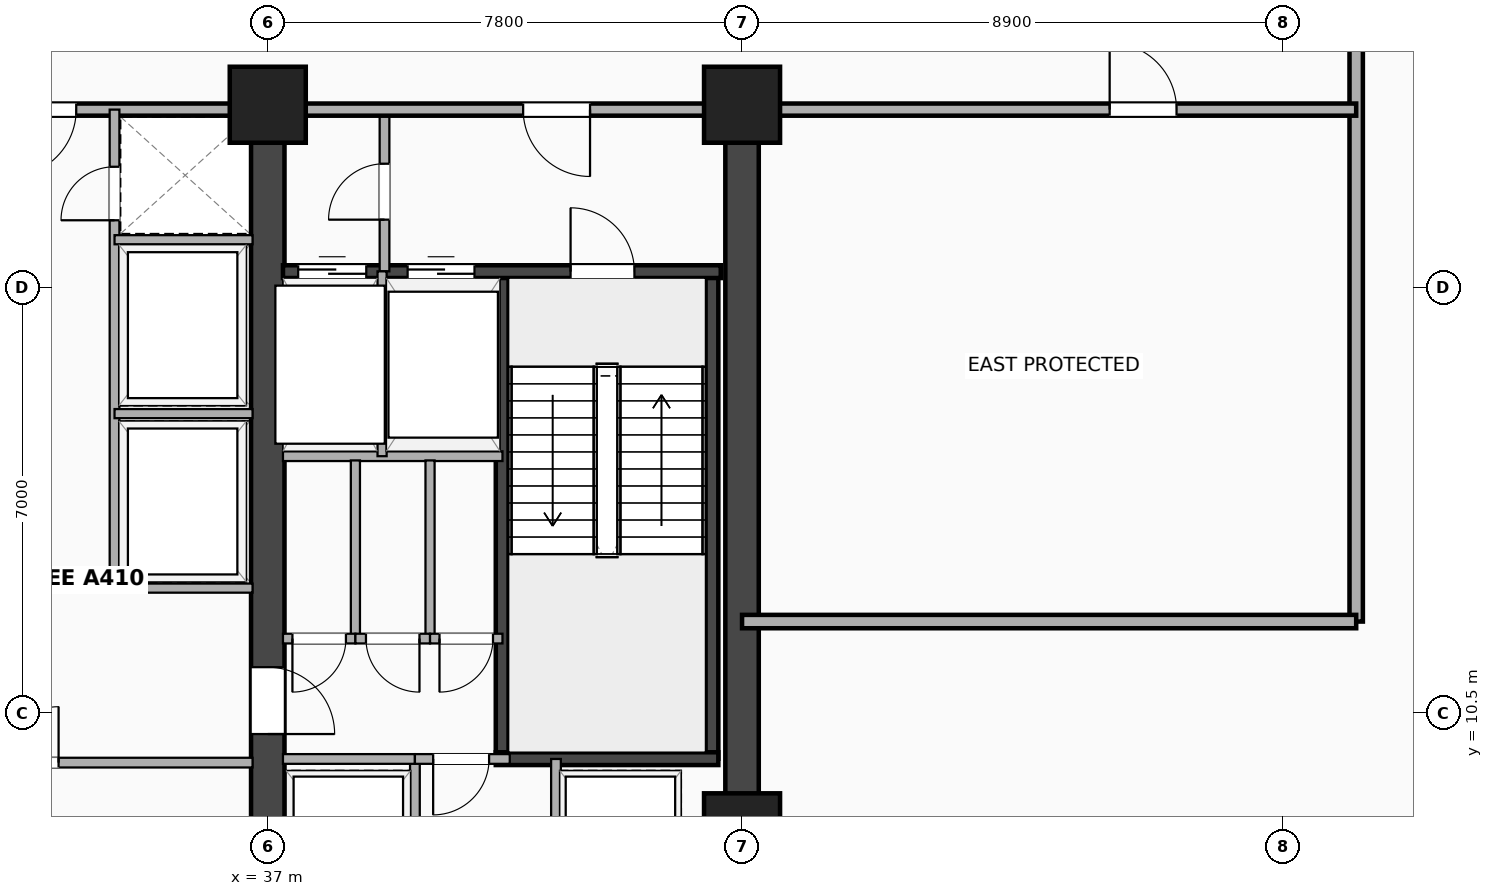
"""IFC4 building model, lengths in metres.
Left out: names, types, materials, properties, quantities, classifications, styles, units other than length and angle.
Written with IfcOpenShell. Run it as: python <this file> out.ifc"""

import sys

from ifc_helpers import new_model, si_unit, direction, frame, frame_2d, origin, origin_2d, place, context, subcontext, project, spatial, rectangle, extrude, element, fill, save


model = new_model("IFC4")
c1 = context("Model", 3, precision=1e-05, world=origin(), true_north=direction((0.0, 1.0)))
c2 = subcontext(c1, "Body", "Model", "MODEL_VIEW")
j1 = project(units=[si_unit("LENGTHUNIT", "METRE"), si_unit("PLANEANGLEUNIT", "RADIAN")], contexts=[c1])
p1 = place(None, origin())
s1 = spatial("IfcSite", under=j1, at=p1, CompositionType="ELEMENT")
p2 = place(p1, origin())
s2 = spatial("IfcBuilding", under=s1, at=p2, CompositionType="ELEMENT")
p3 = place(p2, frame((0.0, 0.0, 130.2)))
s3 = spatial("IfcBuildingStorey", under=s2, at=p3, CompositionType="ELEMENT", Elevation=130.2)
p4 = place(p3, frame((44.8, 3.5, 0.0), z_axis=(0.0, 0.0, 1.0), x_axis=(0.0, 1.0, 0.0)))
e1 = element("IfcWall", 1, at=p4, inside=s3, PredefinedType="SHEAR", context=c2, shape_type="SweptSolid", body=[
    extrude(rectangle(XDim=16.9, YDim=0.55, at=frame_2d((8.45, 0.0))), origin(), (0.0, 0.0, 1.0), 8.15),
])
p5 = place(p3, frame((37.0, 3.5, 0.0), z_axis=(0.0, 0.0, 1.0), x_axis=(0.0, 1.0, 0.0)))
e2 = element("IfcWall", 2, at=p5, inside=s3, PredefinedType="SHEAR", context=c2, shape_type="SweptSolid", body=[
    extrude(rectangle(XDim=16.9, YDim=0.55, at=frame_2d((8.45, 0.0))), origin(), (0.0, 0.0, 1.0), 8.15),
])
p6 = place(p5, frame((6.65, 0.0, 0.0)))
e3 = element("IfcOpeningElement", 3, at=p6, cuts=e2, PredefinedType="OPENING", context=c2, shape_type="SweptSolid", body=[
    extrude(rectangle(XDim=1.1, YDim=2.15, at=frame_2d((0.55, 1.075))), frame((0.0, 0.285, 0.0), z_axis=(0.0, -1.0, 0.0), x_axis=(1.0, 0.0, 0.0)), (0.0, 0.0, 1.0), 0.57),
])
for number, where, z_axis, x_axis in (
    (4, (40.855, 9.745, 0.0), (0.0, 0.0, 1.0), (0.0, 1.0, 0.0)),
    (5, (44.305, 9.745, 0.0), (0.0, 0.0, 1.0), (0.0, 1.0, 0.0)),
):
    element("IfcWall", number, at=place(p3, frame(where, z_axis=z_axis, x_axis=x_axis)), inside=s3, PredefinedType="SHEAR", context=c2, shape_type="SweptSolid", body=[
        extrude(rectangle(XDim=8.01, YDim=0.21, at=frame_2d((4.005, 0.0))), origin(), (0.0, 0.0, 1.0), 8.15),
    ])
p7 = place(p3, frame((40.75, 9.745, 0.0), z_axis=(0.0, 0.0, 1.0), x_axis=(1.0, 0.0, 0.0)))
e6 = element("IfcWall", 6, at=p7, inside=s3, PredefinedType="SHEAR", context=c2, shape_type="SweptSolid", body=[
    extrude(rectangle(XDim=3.66, YDim=0.21, at=frame_2d((1.83, 0.0))), origin(), (0.0, 0.0, 1.0), 8.15),
])
p8 = place(p3, frame((37.25, 17.755, 0.0), z_axis=(0.0, 0.0, 1.0), x_axis=(1.0, 0.0, 0.0)))
e7 = element("IfcWall", 7, at=p8, inside=s3, PredefinedType="SHEAR", context=c2, shape_type="SweptSolid", body=[
    extrude(rectangle(XDim=7.2, YDim=0.21, at=frame_2d((3.6, 0.0))), origin(), (0.0, 0.0, 1.0), 8.15),
])
p9 = place(p8, frame((0.25, 0.0, 0.0)))
e8 = element("IfcOpeningElement", 8, at=p9, cuts=e7, PredefinedType="OPENING", context=c2, shape_type="SweptSolid", body=[
    extrude(rectangle(XDim=1.12, YDim=2.2, at=frame_2d((0.56, 1.1))), frame((0.0, 0.115, 0.0), z_axis=(0.0, -1.0, 0.0), x_axis=(1.0, 0.0, 0.0)), (0.0, 0.0, 1.0), 0.23),
])
p10 = place(p8, frame((2.05, 0.0, 0.0)))
e9 = element("IfcOpeningElement", 9, at=p10, cuts=e7, PredefinedType="OPENING", context=c2, shape_type="SweptSolid", body=[
    extrude(rectangle(XDim=1.1, YDim=2.18, at=frame_2d((0.55, 1.09))), frame((0.0, 0.115, 0.0), z_axis=(0.0, -1.0, 0.0), x_axis=(1.0, 0.0, 0.0)), (0.0, 0.0, 1.0), 0.23),
])
p11 = place(p8, frame((5.78, 0.0, 0.0), z_axis=(0.0, 0.0, 1.0), x_axis=(-1.0, 0.0, 0.0)))
e10 = element("IfcOpeningElement", 10, at=p11, cuts=e7, PredefinedType="OPENING", context=c2, shape_type="SweptSolid", body=[
    extrude(rectangle(XDim=1.05, YDim=2.15, at=frame_2d((0.525, 1.075))), frame((0.0, 0.115, 0.0), z_axis=(0.0, -1.0, 0.0), x_axis=(1.0, 0.0, 0.0)), (0.0, 0.0, 1.0), 0.23),
])
for number, where, z_axis, x_axis in (
    (11, (44.8, 8.55, -0.32), (0.0, 0.0, 1.0), (1.0, 0.0, 0.0)),
    (12, (37.0, 20.5, -0.32), (0.0, 0.0, 1.0), (1.0, 0.0, 0.0)),
    (13, (44.8, 20.5, -0.32), (0.0, 0.0, 1.0), (1.0, 0.0, 0.0)),
):
    element("IfcColumn", number, at=place(p3, frame(where, z_axis=z_axis, x_axis=x_axis)), inside=s3, PredefinedType="COLUMN", context=c2, shape_type="SweptSolid", body=[
        extrude(rectangle(XDim=1.25, YDim=1.25, at=origin_2d()), origin(), (0.0, 0.0, 1.0), 8.47),
    ])
p12 = place(p3, frame((38.92, 17.76, 0.0), z_axis=(0.0, 0.0, 1.0), x_axis=(0.0, 1.0, 0.0)))
e14 = element("IfcWall", 14, at=p12, inside=s3, PredefinedType="PARTITIONING", context=c2, shape_type="SweptSolid", body=[
    extrude(rectangle(XDim=2.66, YDim=0.16, at=frame_2d((1.33, 0.0))), origin(), (0.0, 0.0, 1.0), 7.524),
])
p13 = place(p12, frame((1.77, 0.0, 0.0), z_axis=(0.0, 0.0, 1.0), x_axis=(-1.0, 0.0, 0.0)))
e15 = element("IfcOpeningElement", 15, at=p13, cuts=e14, PredefinedType="OPENING", context=c2, shape_type="SweptSolid", body=[
    extrude(rectangle(XDim=0.92, YDim=2.08, at=frame_2d((0.46, 1.04))), frame((0.0, 0.09, 0.0), z_axis=(0.0, -1.0, 0.0), x_axis=(1.0, 0.0, 0.0)), (0.0, 0.0, 1.0), 0.18),
])
p14 = place(p3, frame((37.25, 14.72, 0.0), z_axis=(0.0, 0.0, 1.0), x_axis=(1.0, 0.0, 0.0)))
e16 = element("IfcWall", 16, at=p14, inside=s3, PredefinedType="PARTITIONING", context=c2, shape_type="SweptSolid", body=[
    extrude(rectangle(XDim=3.61, YDim=0.16, at=frame_2d((1.805, 0.0))), origin(), (0.0, 0.0, 1.0), 8.15),
])
p15 = place(p3, frame((38.88, 14.72, 0.0), z_axis=(0.0, 0.0, 1.0), x_axis=(0.0, 1.0, 0.0)))
e17 = element("IfcWall", 17, at=p15, inside=s3, PredefinedType="PARTITIONING", context=c2, shape_type="SweptSolid", body=[
    extrude(rectangle(XDim=3.04, YDim=0.15, at=frame_2d((1.52, 0.0))), origin(), (0.0, 0.0, 1.0), 8.15),
])
p16 = place(p3, frame((29.2, 20.42, 0.0), z_axis=(0.0, 0.0, 1.0), x_axis=(1.0, 0.0, 0.0)))
e18 = element("IfcWall", 18, at=p16, inside=s3, PredefinedType="PARTITIONING", context=c2, shape_type="SweptSolid", body=[
    extrude(rectangle(XDim=7.8, YDim=0.2, at=frame_2d((3.9, 0.0))), origin(), (0.0, 0.0, 1.0), 7.223),
])
p17 = place(p16, frame((3.55, 0.0, 0.0)))
e19 = element("IfcOpeningElement", 19, at=p17, cuts=e18, PredefinedType="OPENING", context=c2, shape_type="SweptSolid", body=[
    extrude(rectangle(XDim=1.1, YDim=2.15, at=frame_2d((0.55, 1.075))), frame((0.0, 0.11, 0.0), z_axis=(0.0, -1.0, 0.0), x_axis=(1.0, 0.0, 0.0)), (0.0, 0.0, 1.0), 0.22),
])
p18 = place(p3, frame((37.0, 20.42, 0.0), z_axis=(0.0, 0.0, 1.0), x_axis=(1.0, 0.0, 0.0)))
e20 = element("IfcWall", 20, at=p18, inside=s3, PredefinedType="PARTITIONING", context=c2, shape_type="SweptSolid", body=[
    extrude(rectangle(XDim=7.45, YDim=0.2, at=frame_2d((3.725, 0.0))), origin(), (0.0, 0.0, 1.0), 6.455),
])
p19 = place(p18, frame((4.2, 0.0, 0.0)))
e21 = element("IfcOpeningElement", 21, at=p19, cuts=e20, PredefinedType="OPENING", context=c2, shape_type="SweptSolid", body=[
    extrude(rectangle(XDim=1.1, YDim=2.15, at=frame_2d((0.55, 1.075))), frame((0.0, 0.11, 0.0), z_axis=(0.0, -1.0, 0.0), x_axis=(1.0, 0.0, 0.0)), (0.0, 0.0, 1.0), 0.22),
])
p20 = place(p3, frame((38.441, 11.72, 0.0), z_axis=(0.0, 0.0, 1.0), x_axis=(0.0, 1.0, 0.0)))
e22 = element("IfcWall", 22, at=p20, inside=s3, PredefinedType="PARTITIONING", context=c2, shape_type="SweptSolid", body=[
    extrude(rectangle(XDim=2.93, YDim=0.15, at=frame_2d((1.465, 0.0))), origin(), (0.0, 0.0, 1.0), 8.15),
])
p21 = place(p3, frame((37.25, 11.72, 0.0), z_axis=(0.0, 0.0, 1.0), x_axis=(1.0, 0.0, 0.0)))
e23 = element("IfcWall", 23, at=p21, inside=s3, PredefinedType="PARTITIONING", context=c2, shape_type="SweptSolid", body=[
    extrude(rectangle(XDim=1.191, YDim=0.16, at=frame_2d((0.596, 0.0))), origin(), (0.0, 0.0, 1.0), 8.15),
])
p22 = place(p21, frame((0.156, 0.0, 0.0)))
e24 = element("IfcOpeningElement", 24, at=p22, cuts=e23, PredefinedType="OPENING", context=c2, shape_type="SweptSolid", body=[
    extrude(rectangle(XDim=0.88, YDim=2.08, at=frame_2d((0.44, 1.04))), frame((0.0, 0.09, 0.0), z_axis=(0.0, -1.0, 0.0), x_axis=(1.0, 0.0, 0.0)), (0.0, 0.0, 1.0), 0.18),
])
p23 = place(p3, frame((39.669, 11.72, 0.0), z_axis=(0.0, 0.0, 1.0), x_axis=(0.0, 1.0, 0.0)))
e25 = element("IfcWall", 25, at=p23, inside=s3, PredefinedType="PARTITIONING", context=c2, shape_type="SweptSolid", body=[
    extrude(rectangle(XDim=2.93, YDim=0.15, at=frame_2d((1.465, 0.0))), origin(), (0.0, 0.0, 1.0), 8.15),
])
p24 = place(p3, frame((38.441, 11.72, 0.0), z_axis=(0.0, 0.0, 1.0), x_axis=(1.0, 0.0, 0.0)))
e26 = element("IfcWall", 26, at=p24, inside=s3, PredefinedType="PARTITIONING", context=c2, shape_type="SweptSolid", body=[
    extrude(rectangle(XDim=1.227, YDim=0.16, at=frame_2d((0.614, 0.0))), origin(), (0.0, 0.0, 1.0), 8.15),
])
p25 = place(p24, frame((0.174, 0.0, 0.0)))
e27 = element("IfcOpeningElement", 27, at=p25, cuts=e26, PredefinedType="OPENING", context=c2, shape_type="SweptSolid", body=[
    extrude(rectangle(XDim=0.88, YDim=2.08, at=frame_2d((0.44, 1.04))), frame((0.0, 0.09, 0.0), z_axis=(0.0, -1.0, 0.0), x_axis=(1.0, 0.0, 0.0)), (0.0, 0.0, 1.0), 0.18),
])
p26 = place(p3, frame((39.669, 11.72, 0.0), z_axis=(0.0, 0.0, 1.0), x_axis=(1.0, 0.0, 0.0)))
e28 = element("IfcWall", 28, at=p26, inside=s3, PredefinedType="PARTITIONING", context=c2, shape_type="SweptSolid", body=[
    extrude(rectangle(XDim=1.191, YDim=0.16, at=frame_2d((0.596, 0.0))), origin(), (0.0, 0.0, 1.0), 8.15),
])
p27 = place(p26, frame((0.156, 0.0, 0.0)))
e29 = element("IfcOpeningElement", 29, at=p27, cuts=e28, PredefinedType="OPENING", context=c2, shape_type="SweptSolid", body=[
    extrude(rectangle(XDim=0.88, YDim=2.08, at=frame_2d((0.44, 1.04))), frame((0.0, 0.09, 0.0), z_axis=(0.0, -1.0, 0.0), x_axis=(1.0, 0.0, 0.0)), (0.0, 0.0, 1.0), 0.18),
])
for number, where, z_axis, x_axis in (
    (30, (39.42, 3.9, 0.0), (0.0, 0.0, 1.0), (0.0, 1.0, 0.0)),
    (31, (41.74, 3.9, 0.0), (0.0, 0.0, 1.0), (0.0, 1.0, 0.0)),
):
    element("IfcWall", number, at=place(p3, frame(where, z_axis=z_axis, x_axis=x_axis)), inside=s3, PredefinedType="PARTITIONING", context=c2, shape_type="SweptSolid", body=[
        extrude(rectangle(XDim=5.84, YDim=0.16, at=frame_2d((2.92, 0.0))), origin(), (0.0, 0.0, 1.0), 8.15),
    ])
p28 = place(p3, frame((37.25, 9.74, 0.0), z_axis=(0.0, 0.0, 1.0), x_axis=(1.0, 0.0, 0.0)))
e32 = element("IfcWall", 32, at=p28, inside=s3, PredefinedType="PARTITIONING", context=c2, shape_type="SweptSolid", body=[
    extrude(rectangle(XDim=2.17, YDim=0.16, at=frame_2d((1.085, 0.0))), origin(), (0.0, 0.0, 1.0), 8.15),
])
p29 = place(p3, frame((39.42, 9.74, 0.0), z_axis=(0.0, 0.0, 1.0), x_axis=(1.0, 0.0, 0.0)))
e33 = element("IfcWall", 33, at=p29, inside=s3, PredefinedType="PARTITIONING", context=c2, shape_type="SweptSolid", body=[
    extrude(rectangle(XDim=1.56, YDim=0.16, at=frame_2d((0.78, 0.0))), origin(), (0.0, 0.0, 1.0), 8.15),
])
p30 = place(p29, frame((0.3, 0.0, 0.0)))
e34 = element("IfcOpeningElement", 34, at=p30, cuts=e33, PredefinedType="OPENING", context=c2, shape_type="SweptSolid", body=[
    extrude(rectangle(XDim=0.92, YDim=2.08, at=frame_2d((0.46, 1.04))), frame((0.0, 0.09, 0.0), z_axis=(0.0, -1.0, 0.0), x_axis=(1.0, 0.0, 0.0)), (0.0, 0.0, 1.0), 0.18),
])
p31 = place(p3, frame((29.45, 9.68, 0.0), z_axis=(0.0, 0.0, 1.0), x_axis=(1.0, 0.0, 0.0)))
e35 = element("IfcWall", 35, at=p31, inside=s3, PredefinedType="PARTITIONING", context=c2, shape_type="SweptSolid", body=[
    extrude(rectangle(XDim=7.3, YDim=0.16, at=frame_2d((3.65, 0.0))), origin(), (0.0, 0.0, 1.0), 8.15),
])
p32 = place(p31, frame((4.11, 0.0, 0.0), z_axis=(0.0, 0.0, 1.0), x_axis=(-1.0, 0.0, 0.0)))
e36 = element("IfcOpeningElement", 36, at=p32, cuts=e35, PredefinedType="OPENING", context=c2, shape_type="SweptSolid", body=[
    extrude(rectangle(XDim=0.92, YDim=2.08, at=frame_2d((0.46, 1.04))), frame((0.0, 0.09, 0.0), z_axis=(0.0, -1.0, 0.0), x_axis=(1.0, 0.0, 0.0)), (0.0, 0.0, 1.0), 0.18),
])
p33 = place(p3, frame((34.48, 12.5, 0.0), z_axis=(0.0, 0.0, 1.0), x_axis=(0.0, 1.0, 0.0)))
e37 = element("IfcWall", 37, at=p33, inside=s3, PredefinedType="PARTITIONING", context=c2, shape_type="SweptSolid", body=[
    extrude(rectangle(XDim=7.92, YDim=0.16, at=frame_2d((3.96, 0.0))), origin(), (0.0, 0.0, 1.0), 7.524),
])
p34 = place(p33, frame((6.98, 0.0, 0.0), z_axis=(0.0, 0.0, 1.0), x_axis=(-1.0, 0.0, 0.0)))
e38 = element("IfcOpeningElement", 38, at=p34, cuts=e37, PredefinedType="OPENING", context=c2, shape_type="SweptSolid", body=[
    extrude(rectangle(XDim=0.88, YDim=2.08, at=frame_2d((0.44, 1.04))), frame((0.0, 0.09, 0.0), z_axis=(0.0, -1.0, 0.0), x_axis=(1.0, 0.0, 0.0)), (0.0, 0.0, 1.0), 0.18),
])
for number, where, z_axis, x_axis in (
    (39, (34.48, 12.55, 0.0), (0.0, 0.0, 1.0), (1.0, 0.0, 0.0)),
    (40, (34.48, 15.42, 0.0), (0.0, 0.0, 1.0), (1.0, 0.0, 0.0)),
    (41, (34.48, 18.28, 0.0), (0.0, 0.0, 1.0), (1.0, 0.0, 0.0)),
):
    element("IfcWall", number, at=place(p3, frame(where, z_axis=z_axis, x_axis=x_axis)), inside=s3, PredefinedType="PARTITIONING", context=c2, shape_type="SweptSolid", body=[
        extrude(rectangle(XDim=2.27, YDim=0.15, at=frame_2d((1.135, 0.0))), origin(), (0.0, 0.0, 1.0), 8.15),
    ])
p35 = place(p3, frame((54.9, 12.0, 0.0), z_axis=(0.0, 0.0, 1.0), x_axis=(0.0, 1.0, 0.0)))
e42 = element("IfcWall", 42, at=p35, inside=s3, PredefinedType="PARTITIONING", context=c2, shape_type="SweptSolid", body=[
    extrude(rectangle(XDim=20.8, YDim=0.22, at=frame_2d((10.4, 0.0))), origin(), (0.0, 0.0, 1.0), 6.455),
])
p36 = place(p3, frame((44.8, 12.0, 0.0), z_axis=(0.0, 0.0, 1.0), x_axis=(1.0, 0.0, 0.0)))
e43 = element("IfcWall", 43, at=p36, inside=s3, PredefinedType="PARTITIONING", context=c2, shape_type="SweptSolid", body=[
    extrude(rectangle(XDim=10.1, YDim=0.22, at=frame_2d((5.05, 0.0))), origin(), (0.0, 0.0, 1.0), 6.455),
])
p37 = place(p3, frame((44.8, 20.42, 0.0), z_axis=(0.0, 0.0, 1.0), x_axis=(1.0, 0.0, 0.0)))
e44 = element("IfcWall", 44, at=p37, inside=s3, PredefinedType="PARTITIONING", context=c2, shape_type="SweptSolid", body=[
    extrude(rectangle(XDim=10.1, YDim=0.2, at=frame_2d((5.05, 0.0))), origin(), (0.0, 0.0, 1.0), 6.455),
])
p38 = place(p37, frame((7.146, 0.0, 0.0), z_axis=(0.0, 0.0, 1.0), x_axis=(-1.0, 0.0, 0.0)))
e45 = element("IfcOpeningElement", 45, at=p38, cuts=e44, PredefinedType="OPENING", context=c2, shape_type="SweptSolid", body=[
    extrude(rectangle(XDim=1.1, YDim=2.15, at=frame_2d((0.55, 1.075))), frame((0.0, 0.11, 0.0), z_axis=(0.0, -1.0, 0.0), x_axis=(1.0, 0.0, 0.0)), (0.0, 0.0, 1.0), 0.22),
])
p39 = place(p9, origin())
e46 = element("IfcDoor", 46, at=p39, inside=s3, OperationType="DOUBLE_DOOR_SLIDING", PredefinedType="DOOR", context=c2, shape_type="SweptSolid", body=[
    extrude(rectangle(XDim=1.12, YDim=2.2, at=frame_2d((0.56, 1.1))), frame((0.0, 0.025, 0.0), z_axis=(0.0, -1.0, 0.0), x_axis=(1.0, 0.0, 0.0)), (0.0, 0.0, 1.0), 0.05),
])
fill(e8, e46)
p40 = place(p10, origin())
e47 = element("IfcDoor", 47, at=p40, inside=s3, OperationType="DOUBLE_DOOR_SLIDING", PredefinedType="DOOR", context=c2, shape_type="SweptSolid", body=[
    extrude(rectangle(XDim=1.1, YDim=2.18, at=frame_2d((0.55, 1.09))), frame((0.0, 0.025, 0.0), z_axis=(0.0, -1.0, 0.0), x_axis=(1.0, 0.0, 0.0)), (0.0, 0.0, 1.0), 0.05),
])
fill(e9, e47)
p41 = place(p11, origin())
e48 = element("IfcDoor", 48, at=p41, inside=s3, OperationType="SINGLE_SWING_LEFT", PredefinedType="DOOR", context=c2, shape_type="SweptSolid", body=[
    extrude(rectangle(XDim=1.05, YDim=2.15, at=frame_2d((0.525, 1.075))), frame((0.0, 0.025, 0.0), z_axis=(0.0, -1.0, 0.0), x_axis=(1.0, 0.0, 0.0)), (0.0, 0.0, 1.0), 0.05),
])
fill(e10, e48)
p42 = place(p6, origin())
e49 = element("IfcDoor", 49, at=p42, inside=s3, OperationType="SINGLE_SWING_LEFT", PredefinedType="DOOR", context=c2, shape_type="SweptSolid", body=[
    extrude(rectangle(XDim=1.1, YDim=2.15, at=frame_2d((0.55, 1.075))), frame((0.0, 0.025, 0.0), z_axis=(0.0, -1.0, 0.0), x_axis=(1.0, 0.0, 0.0)), (0.0, 0.0, 1.0), 0.05),
])
fill(e3, e49)
p43 = place(p13, origin())
e50 = element("IfcDoor", 50, at=p43, inside=s3, OperationType="SINGLE_SWING_LEFT", PredefinedType="DOOR", context=c2, shape_type="SweptSolid", body=[
    extrude(rectangle(XDim=0.92, YDim=2.08, at=frame_2d((0.46, 1.04))), frame((0.0, 0.025, 0.0), z_axis=(0.0, -1.0, 0.0), x_axis=(1.0, 0.0, 0.0)), (0.0, 0.0, 1.0), 0.05),
])
fill(e15, e50)
p44 = place(p17, origin())
e51 = element("IfcDoor", 51, at=p44, inside=s3, OperationType="SINGLE_SWING_LEFT", PredefinedType="DOOR", context=c2, shape_type="SweptSolid", body=[
    extrude(rectangle(XDim=1.1, YDim=2.15, at=frame_2d((0.55, 1.075))), frame((0.0, 0.025, 0.0), z_axis=(0.0, -1.0, 0.0), x_axis=(1.0, 0.0, 0.0)), (0.0, 0.0, 1.0), 0.05),
])
fill(e19, e51)
p45 = place(p19, origin())
e52 = element("IfcDoor", 52, at=p45, inside=s3, OperationType="SINGLE_SWING_RIGHT", PredefinedType="DOOR", context=c2, shape_type="SweptSolid", body=[
    extrude(rectangle(XDim=1.1, YDim=2.15, at=frame_2d((0.55, 1.075))), frame((0.0, 0.025, 0.0), z_axis=(0.0, -1.0, 0.0), x_axis=(1.0, 0.0, 0.0)), (0.0, 0.0, 1.0), 0.05),
])
fill(e21, e52)
p46 = place(p22, origin())
e53 = element("IfcDoor", 53, at=p46, inside=s3, OperationType="SINGLE_SWING_LEFT", PredefinedType="DOOR", context=c2, shape_type="SweptSolid", body=[
    extrude(rectangle(XDim=0.88, YDim=2.08, at=frame_2d((0.44, 1.04))), frame((0.0, 0.025, 0.0), z_axis=(0.0, -1.0, 0.0), x_axis=(1.0, 0.0, 0.0)), (0.0, 0.0, 1.0), 0.05),
])
fill(e24, e53)
p47 = place(p25, origin())
e54 = element("IfcDoor", 54, at=p47, inside=s3, OperationType="SINGLE_SWING_RIGHT", PredefinedType="DOOR", context=c2, shape_type="SweptSolid", body=[
    extrude(rectangle(XDim=0.88, YDim=2.08, at=frame_2d((0.44, 1.04))), frame((0.0, 0.025, 0.0), z_axis=(0.0, -1.0, 0.0), x_axis=(1.0, 0.0, 0.0)), (0.0, 0.0, 1.0), 0.05),
])
fill(e27, e54)
p48 = place(p27, origin())
e55 = element("IfcDoor", 55, at=p48, inside=s3, OperationType="SINGLE_SWING_LEFT", PredefinedType="DOOR", context=c2, shape_type="SweptSolid", body=[
    extrude(rectangle(XDim=0.88, YDim=2.08, at=frame_2d((0.44, 1.04))), frame((0.0, 0.025, 0.0), z_axis=(0.0, -1.0, 0.0), x_axis=(1.0, 0.0, 0.0)), (0.0, 0.0, 1.0), 0.05),
])
fill(e29, e55)
p49 = place(p30, origin())
e56 = element("IfcDoor", 56, at=p49, inside=s3, OperationType="SINGLE_SWING_LEFT", PredefinedType="DOOR", context=c2, shape_type="SweptSolid", body=[
    extrude(rectangle(XDim=0.92, YDim=2.08, at=frame_2d((0.46, 1.04))), frame((0.0, 0.025, 0.0), z_axis=(0.0, -1.0, 0.0), x_axis=(1.0, 0.0, 0.0)), (0.0, 0.0, 1.0), 0.05),
])
fill(e34, e56)
p50 = place(p32, origin())
e57 = element("IfcDoor", 57, at=p50, inside=s3, OperationType="SINGLE_SWING_RIGHT", PredefinedType="DOOR", context=c2, shape_type="SweptSolid", body=[
    extrude(rectangle(XDim=0.92, YDim=2.08, at=frame_2d((0.46, 1.04))), frame((0.0, 0.025, 0.0), z_axis=(0.0, -1.0, 0.0), x_axis=(1.0, 0.0, 0.0)), (0.0, 0.0, 1.0), 0.05),
])
fill(e36, e57)
p51 = place(p34, origin())
e58 = element("IfcDoor", 58, at=p51, inside=s3, OperationType="SINGLE_SWING_LEFT", PredefinedType="DOOR", context=c2, shape_type="SweptSolid", body=[
    extrude(rectangle(XDim=0.88, YDim=2.08, at=frame_2d((0.44, 1.04))), frame((0.0, 0.025, 0.0), z_axis=(0.0, -1.0, 0.0), x_axis=(1.0, 0.0, 0.0)), (0.0, 0.0, 1.0), 0.05),
])
fill(e38, e58)
p52 = place(p38, origin())
e59 = element("IfcDoor", 59, at=p52, inside=s3, OperationType="SINGLE_SWING_LEFT", PredefinedType="DOOR", context=c2, shape_type="SweptSolid", body=[
    extrude(rectangle(XDim=1.1, YDim=2.15, at=frame_2d((0.55, 1.075))), frame((0.0, 0.025, 0.0), z_axis=(0.0, -1.0, 0.0), x_axis=(1.0, 0.0, 0.0)), (0.0, 0.0, 1.0), 0.05),
])
fill(e45, e59)
save(model, sys.argv[1])
